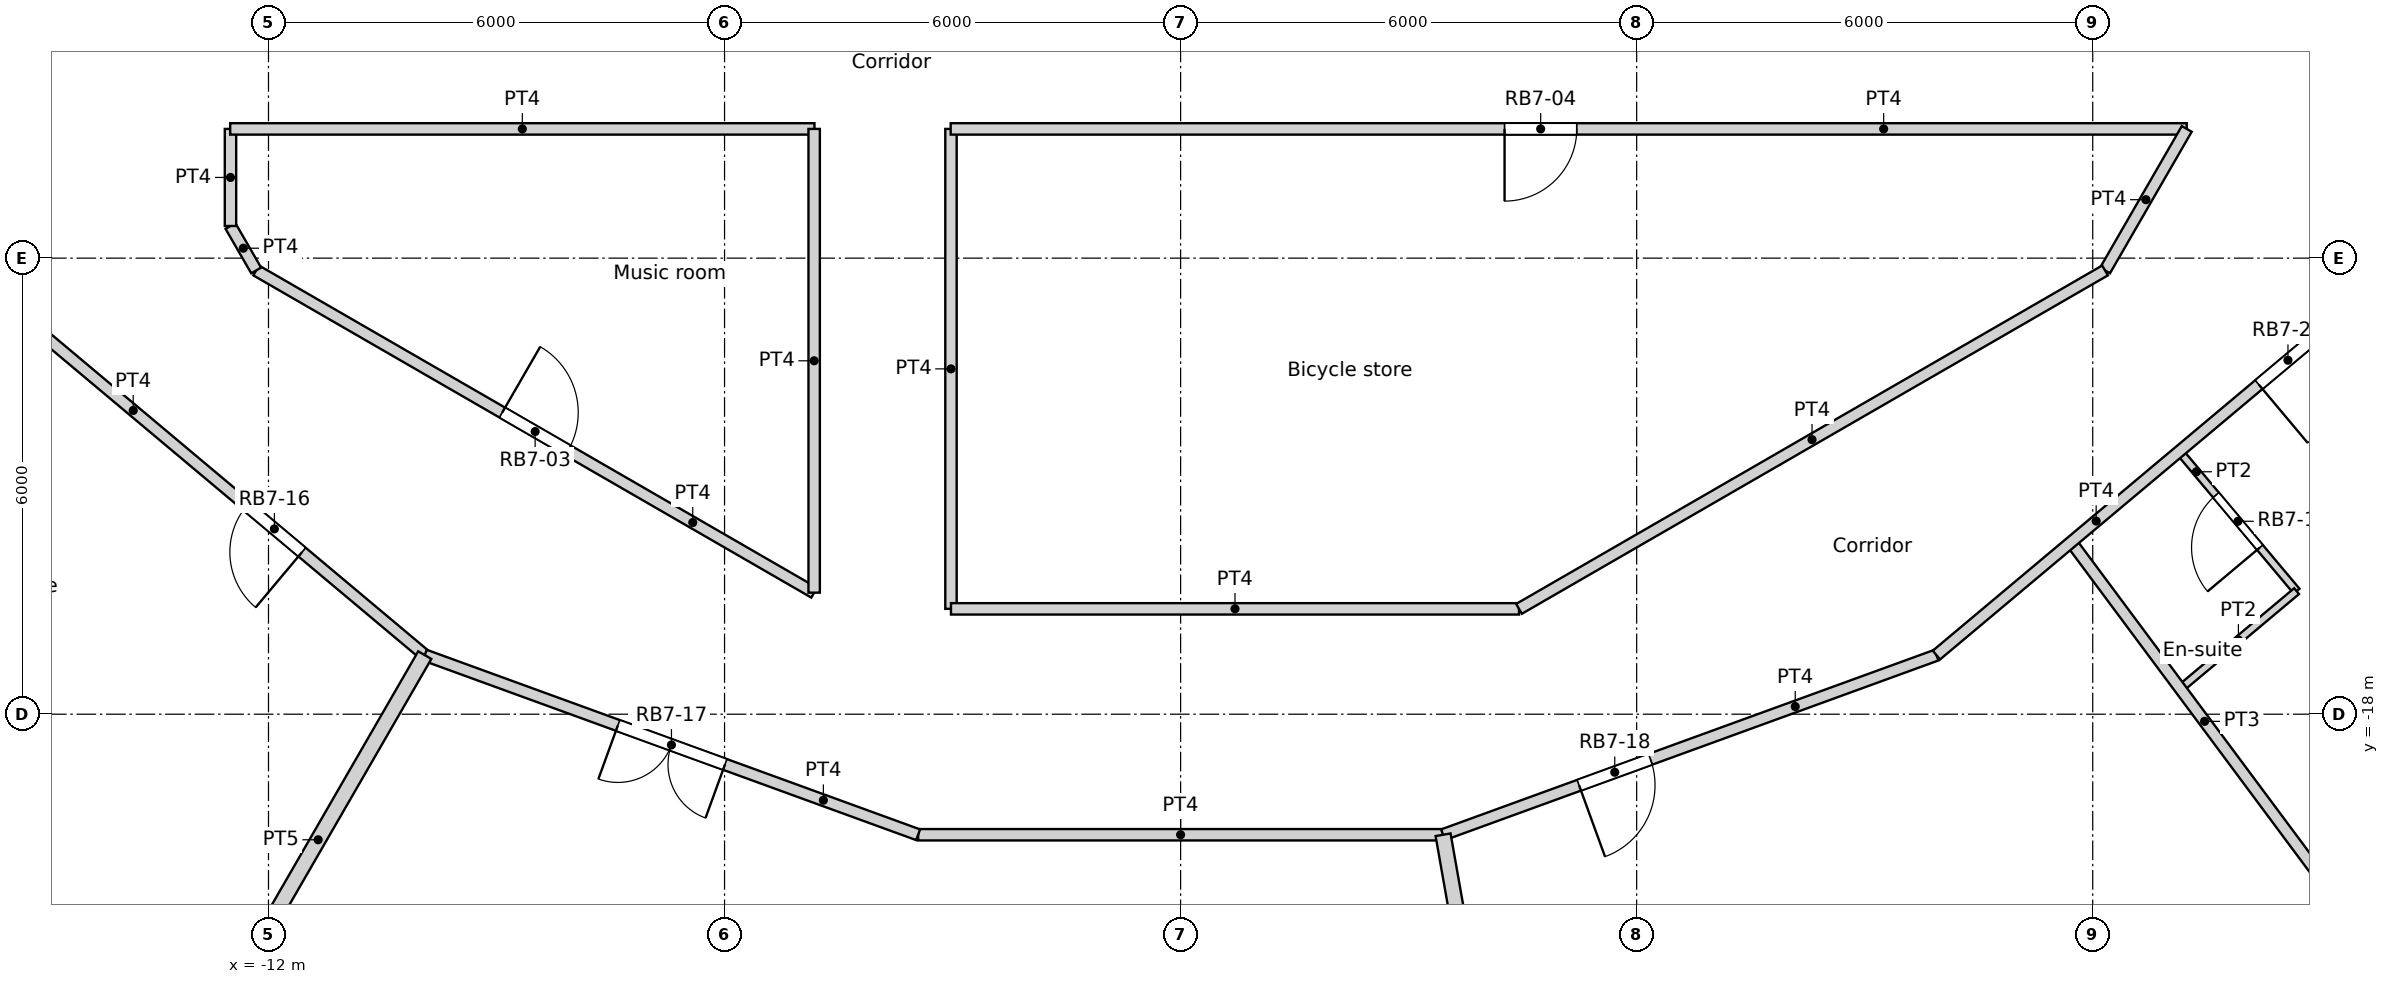
"""IFC4 building model, lengths in metres.
Left out: names, types, materials, properties, quantities, classifications, styles, units other than length and angle.
Written with IfcOpenShell. Run it as: python <this file> out.ifc"""

import sys

from ifc_helpers import new_model, si_unit, direction, frame, frame_2d, origin, origin_2d, place, context, subcontext, project, spatial, rectangle, circle, extrude, element, fill, save


model = new_model("IFC4")
c1 = context("Model", 3, precision=1e-05, world=origin(), true_north=direction((0.0, 1.0)))
c2 = subcontext(c1, "Body", "Model", "MODEL_VIEW")
j1 = project(units=[si_unit("LENGTHUNIT", "METRE"), si_unit("PLANEANGLEUNIT", "RADIAN")], contexts=[c1])
p1 = place(None, origin())
s1 = spatial("IfcSite", under=j1, at=p1, CompositionType="ELEMENT")
p2 = place(p1, origin())
s2 = spatial("IfcBuilding", under=s1, at=p2, CompositionType="ELEMENT")
p3 = place(p2, frame((0.0, 0.0, 190.8)))
s3 = spatial("IfcBuildingStorey", under=s2, at=p3, CompositionType="ELEMENT", Elevation=190.8)
p4 = place(p3, frame((14.659, -19.69, 0.0), z_axis=(0.0, 0.0, 1.0), x_axis=(1.0, 0.0, 0.0)))
e1 = element("IfcColumn", 1, at=p4, inside=s3, PredefinedType="COLUMN", context=c2, shape_type="SweptSolid", body=[
    extrude(circle(Radius=0.6, at=origin_2d()), origin(), (0.0, 0.0, 1.0), 3.6),
])
for number, where, z_axis, x_axis in (
    (2, (-13.798, -12.802, 0.0), (0.0, 0.0, 1.0), (1.0, 0.0, 0.0)),
    (3, (-9.411, -16.301, 0.0), (0.0, 0.0, 1.0), (1.0, 0.0, 0.0)),
    (4, (-4.188, -18.35, 0.0), (0.0, 0.0, 1.0), (1.0, 0.0, 0.0)),
    (5, (1.406, -18.77, 0.0), (0.0, 0.0, 1.0), (1.0, 0.0, 0.0)),
    (6, (6.876, -17.521, 0.0), (0.0, 0.0, 1.0), (1.0, 0.0, 0.0)),
    (7, (11.735, -14.716, 0.0), (0.0, 0.0, 1.0), (1.0, 0.0, 0.0)),
):
    element("IfcColumn", number, at=place(p3, frame(where, z_axis=z_axis, x_axis=x_axis)), inside=s3, PredefinedType="COLUMN", context=c2, shape_type="SweptSolid", body=[
        extrude(circle(Radius=0.65, at=origin_2d()), origin(), (0.0, 0.0, 1.0), 3.6),
    ])
p5 = place(p3, frame((-15.639, -21.048, -0.3), z_axis=(0.0, 0.0, 1.0), x_axis=(0.835514416706, -0.549468524554, 0.0)))
e8 = element("IfcWall", 8, at=p5, inside=s3, PredefinedType="ELEMENTEDWALL", context=c2, shape_type="SweptSolid", body=[
    extrude(rectangle(XDim=3.0, YDim=1.45, at=frame_2d((1.5, 0.0))), origin(), (0.0, 0.0, 1.0), 3.6),
])
p6 = place(p5, frame((1.5, 0.0, 1.85)))
e9 = element("IfcOpeningElement", 9, at=p6, cuts=e8, PredefinedType="OPENING", context=c2, shape_type="SweptSolid", body=[
    extrude(circle(Radius=0.9, at=origin_2d()), frame((0.0, 0.735, 0.0), z_axis=(0.0, -1.0, 0.0), x_axis=(1.0, 0.0, 0.0)), (0.0, 0.0, 1.0), 1.47),
])
p7 = place(p3, frame((12.832, -22.206, 0.0), z_axis=(0.0, 0.0, 1.0), x_axis=(0.835508361394, 0.54947773207, 0.0)))
e10 = element("IfcWall", 10, at=p7, inside=s3, PredefinedType="SOLIDWALL", context=c2, shape_type="SweptSolid", body=[
    extrude(rectangle(XDim=2.973, YDim=0.3, at=frame_2d((1.486, 0.0))), origin(), (0.0, 0.0, 1.0), 2.8),
])
p8 = place(p7, frame((1.486, 0.0, 1.55)))
e11 = element("IfcOpeningElement", 11, at=p8, cuts=e10, PredefinedType="OPENING", context=c2, shape_type="SweptSolid", body=[
    extrude(circle(Radius=0.9, at=origin_2d()), frame((0.0, 0.16, 0.0), z_axis=(0.0, -1.0, 0.0), x_axis=(1.0, 0.0, 0.0)), (0.0, 0.0, 1.0), 0.32),
])
p9 = place(p3, frame((-12.504, -10.3, 0.0), z_axis=(0.0, 0.0, 1.0), x_axis=(1.0, 0.0, 0.0)))
e12 = element("IfcWall", 12, at=p9, inside=s3, PredefinedType="PARTITIONING", context=c2, shape_type="SweptSolid", body=[
    extrude(rectangle(XDim=7.687, YDim=0.15, at=frame_2d((3.844, 0.0))), origin(), (0.0, 0.0, 1.0), 3.3),
])
p10 = place(p3, frame((-3.025, -10.3, 0.0), z_axis=(0.0, 0.0, 1.0), x_axis=(1.0, 0.0, 0.0)))
e13 = element("IfcWall", 13, at=p10, inside=s3, PredefinedType="PARTITIONING", context=c2, shape_type="SweptSolid", body=[
    extrude(rectangle(XDim=16.262, YDim=0.15, at=frame_2d((8.131, 0.0))), origin(), (0.0, 0.0, 1.0), 3.3),
])
p11 = place(p10, frame((7.287, 0.0, 0.0)))
e14 = element("IfcOpeningElement", 14, at=p11, cuts=e13, PredefinedType="OPENING", context=c2, shape_type="SweptSolid", body=[
    extrude(rectangle(XDim=0.95, YDim=2.1, at=frame_2d((0.475, 1.05))), frame((0.0, 0.075, 0.0), z_axis=(0.0, -1.0, 0.0), x_axis=(1.0, 0.0, 0.0)), (0.0, 0.0, 1.0), 0.15),
])
p12 = place(p3, frame((12.162, -12.162, 0.0), z_axis=(0.0, 0.0, 1.0), x_axis=(0.499961633463, 0.866047553582, 0.0)))
e15 = element("IfcWall", 15, at=p12, inside=s3, PredefinedType="PARTITIONING", context=c2, shape_type="SweptSolid", body=[
    extrude(rectangle(XDim=2.15, YDim=0.15, at=frame_2d((1.075, 0.0))), origin(), (0.0, 0.0, 1.0), 3.3),
])
p13 = place(p3, frame((9.943, -17.222, 0.0), z_axis=(0.0, 0.0, 1.0), x_axis=(0.766192104565, 0.642611592567, 0.0)))
e16 = element("IfcWall", 16, at=p13, inside=s3, PredefinedType="PARTITIONING", context=c2, shape_type="SweptSolid", body=[
    extrude(rectangle(XDim=6.906, YDim=0.15, at=frame_2d((3.453, 0.0))), origin(), (0.0, 0.0, 1.0), 3.3),
])
p14 = place(p13, frame((5.537, 0.0, 0.0)))
e17 = element("IfcOpeningElement", 17, at=p14, cuts=e16, PredefinedType="OPENING", context=c2, shape_type="SweptSolid", body=[
    extrude(rectangle(XDim=1.0, YDim=2.1, at=frame_2d((0.5, 1.05))), frame((0.0, 0.075, 0.0), z_axis=(0.0, -1.0, 0.0), x_axis=(1.0, 0.0, 0.0)), (0.0, 0.0, 1.0), 0.15),
])
p15 = place(p3, frame((-12.5, -11.577, 0.0), z_axis=(0.0, 0.0, 1.0), x_axis=(0.0, 1.0, 0.0)))
e18 = element("IfcWall", 18, at=p15, inside=s3, PredefinedType="PARTITIONING", context=c2, shape_type="SweptSolid", body=[
    extrude(rectangle(XDim=1.277, YDim=0.15, at=frame_2d((0.638, 0.0))), origin(), (0.0, 0.0, 1.0), 3.3),
])
p16 = place(p3, frame((-12.5, -11.577, 0.0), z_axis=(0.0, 0.0, 1.0), x_axis=(0.500024767483, -0.866011103799, 0.0)))
e19 = element("IfcWall", 19, at=p16, inside=s3, PredefinedType="PARTITIONING", context=c2, shape_type="SweptSolid", body=[
    extrude(rectangle(XDim=0.676, YDim=0.15, at=frame_2d((0.338, 0.0))), origin(), (0.0, 0.0, 1.0), 3.3),
])
p17 = place(p3, frame((-15.235, -12.784, 0.0), z_axis=(0.0, 0.0, 1.0), x_axis=(0.766192104565, -0.642611592567, 0.0)))
e20 = element("IfcWall", 20, at=p17, inside=s3, PredefinedType="PARTITIONING", context=c2, shape_type="SweptSolid", body=[
    extrude(rectangle(XDim=6.906, YDim=0.15, at=frame_2d((3.453, 0.0))), origin(), (0.0, 0.0, 1.0), 3.3),
])
p18 = place(p17, frame((3.848, 0.0, 0.0)))
e21 = element("IfcOpeningElement", 21, at=p18, cuts=e20, PredefinedType="OPENING", context=c2, shape_type="SweptSolid", body=[
    extrude(rectangle(XDim=0.95, YDim=2.1, at=frame_2d((0.475, 1.05))), frame((0.0, 0.075, 0.0), z_axis=(0.0, -1.0, 0.0), x_axis=(1.0, 0.0, 0.0)), (0.0, 0.0, 1.0), 0.15),
])
p19 = place(p3, frame((-12.162, -12.162, 0.0), z_axis=(0.0, 0.0, 1.0), x_axis=(0.866004766557, -0.500035743023, 0.0)))
e22 = element("IfcWall", 22, at=p19, inside=s3, PredefinedType="PARTITIONING", context=c2, shape_type="SweptSolid", body=[
    extrude(rectangle(XDim=8.477, YDim=0.15, at=frame_2d((4.239, 0.0))), origin(), (0.0, 0.0, 1.0), 3.3),
])
p20 = place(p19, frame((3.738, 0.0, 0.0)))
e23 = element("IfcOpeningElement", 23, at=p20, cuts=e22, PredefinedType="OPENING", context=c2, shape_type="SweptSolid", body=[
    extrude(rectangle(XDim=1.0, YDim=2.04, at=frame_2d((0.5, 1.02))), frame((0.0, 0.075, 0.0), z_axis=(0.0, -1.0, 0.0), x_axis=(1.0, 0.0, 0.0)), (0.0, 0.0, 1.0), 0.15),
])
p21 = place(p3, frame((-4.821, -16.401, 0.0), z_axis=(0.0, 0.0, 1.0), x_axis=(0.0, 1.0, 0.0)))
e24 = element("IfcWall", 24, at=p21, inside=s3, PredefinedType="PARTITIONING", context=c2, shape_type="SweptSolid", body=[
    extrude(rectangle(XDim=6.101, YDim=0.15, at=frame_2d((3.05, 0.0))), origin(), (0.0, 0.0, 1.0), 3.3),
])
p22 = place(p3, frame((-3.021, -16.614, 0.0), z_axis=(0.0, 0.0, 1.0), x_axis=(0.0, 1.0, 0.0)))
e25 = element("IfcWall", 25, at=p22, inside=s3, PredefinedType="PARTITIONING", context=c2, shape_type="SweptSolid", body=[
    extrude(rectangle(XDim=6.314, YDim=0.15, at=frame_2d((3.157, 0.0))), origin(), (0.0, 0.0, 1.0), 3.3),
])
p23 = place(p3, frame((-3.021, -16.614, 0.0), z_axis=(0.0, 0.0, 1.0), x_axis=(1.0, 0.0, 0.0)))
e26 = element("IfcWall", 26, at=p23, inside=s3, PredefinedType="PARTITIONING", context=c2, shape_type="SweptSolid", body=[
    extrude(rectangle(XDim=7.473, YDim=0.15, at=frame_2d((3.736, 0.0))), origin(), (0.0, 0.0, 1.0), 3.3),
])
p24 = place(p3, frame((4.452, -16.614, 0.0), z_axis=(0.0, 0.0, 1.0), x_axis=(0.866005203721, 0.500034985904, 0.0)))
e27 = element("IfcWall", 27, at=p24, inside=s3, PredefinedType="PARTITIONING", context=c2, shape_type="SweptSolid", body=[
    extrude(rectangle(XDim=8.903, YDim=0.15, at=frame_2d((4.452, 0.0))), origin(), (0.0, 0.0, 1.0), 3.3),
])
p25 = place(p3, frame((-3.453, -19.586, 0.0), z_axis=(0.0, 0.0, 1.0), x_axis=(1.0, 0.0, 0.0)))
e28 = element("IfcWall", 28, at=p25, inside=s3, PredefinedType="PARTITIONING", context=c2, shape_type="SweptSolid", body=[
    extrude(rectangle(XDim=6.906, YDim=0.15, at=frame_2d((3.453, 0.0))), origin(), (0.0, 0.0, 1.0), 3.3),
])
p26 = place(p3, frame((-9.944, -17.223, 0.0), z_axis=(0.0, 0.0, 1.0), x_axis=(0.939672634566, -0.342075050021, 0.0)))
e29 = element("IfcWall", 29, at=p26, inside=s3, PredefinedType="PARTITIONING", context=c2, shape_type="SweptSolid", body=[
    extrude(rectangle(XDim=6.908, YDim=0.15, at=frame_2d((3.454, 0.0))), origin(), (0.0, 0.0, 1.0), 3.3),
])
p27 = place(p26, frame((2.704, 0.0, 0.0)))
e30 = element("IfcOpeningElement", 30, at=p27, cuts=e29, PredefinedType="OPENING", context=c2, shape_type="SweptSolid", body=[
    extrude(rectangle(XDim=1.5, YDim=2.1, at=frame_2d((0.75, 1.05))), frame((0.0, 0.075, 0.0), z_axis=(0.0, -1.0, 0.0), x_axis=(1.0, 0.0, 0.0)), (0.0, 0.0, 1.0), 0.15),
])
p28 = place(p3, frame((3.453, -19.586, 0.0), z_axis=(0.0, 0.0, 1.0), x_axis=(0.939672634566, 0.342075050021, 0.0)))
e31 = element("IfcWall", 31, at=p28, inside=s3, PredefinedType="PARTITIONING", context=c2, shape_type="SweptSolid", body=[
    extrude(rectangle(XDim=6.908, YDim=0.15, at=frame_2d((3.454, 0.0))), origin(), (0.0, 0.0, 1.0), 3.3),
])
p29 = place(p28, frame((1.904, 0.0, 0.0)))
e32 = element("IfcOpeningElement", 32, at=p29, cuts=e31, PredefinedType="OPENING", context=c2, shape_type="SweptSolid", body=[
    extrude(rectangle(XDim=1.0, YDim=2.04, at=frame_2d((0.5, 1.02))), frame((0.0, 0.075, 0.0), z_axis=(0.0, -1.0, 0.0), x_axis=(1.0, 0.0, 0.0)), (0.0, 0.0, 1.0), 0.15),
])
p30 = place(p3, frame((-12.749, -22.081, 0.0), z_axis=(0.0, 0.0, 1.0), x_axis=(0.500010020406, 0.866019618423, 0.0)))
e33 = element("IfcWall", 33, at=p30, inside=s3, PredefinedType="PARTITIONING", context=c2, shape_type="SweptSolid", body=[
    extrude(rectangle(XDim=5.61, YDim=0.2, at=frame_2d((2.805, 0.0))), origin(), (0.0, 0.0, 1.0), 3.3),
])
p31 = place(p3, frame((3.453, -19.586, 0.0), z_axis=(0.0, 0.0, 1.0), x_axis=(0.17382754149, -0.984776109489, 0.0)))
e34 = element("IfcWall", 34, at=p31, inside=s3, PredefinedType="PARTITIONING", context=c2, shape_type="SweptSolid", body=[
    extrude(rectangle(XDim=5.61, YDim=0.2, at=frame_2d((2.805, 0.0))), origin(), (0.0, 0.0, 1.0), 3.3),
])
p32 = place(p3, frame((11.717, -15.736, 0.0), z_axis=(0.0, 0.0, 1.0), x_axis=(0.597012012598, -0.802232296043, 0.0)))
e35 = element("IfcWall", 35, at=p32, inside=s3, PredefinedType="PARTITIONING", context=c2, shape_type="SweptSolid", body=[
    extrude(rectangle(XDim=5.878, YDim=0.15, at=frame_2d((2.939, 0.0))), origin(), (0.0, 0.0, 1.0), 3.3),
])
p33 = place(p3, frame((13.151, -17.665, 0.0), z_axis=(0.0, 0.0, 1.0), x_axis=(0.766224532916, 0.642572925945, 0.0)))
e36 = element("IfcWall", 36, at=p33, inside=s3, PredefinedType="PARTITIONING", context=c2, shape_type="SweptSolid", body=[
    extrude(rectangle(XDim=1.998, YDim=0.1, at=frame_2d((0.999, 0.0))), origin(), (0.0, 0.0, 1.0), 3.3),
])
p34 = place(p3, frame((13.139, -14.542, 0.0), z_axis=(0.0, 0.0, 1.0), x_axis=(0.642731657745, -0.766091388891, 0.0)))
e37 = element("IfcWall", 37, at=p34, inside=s3, PredefinedType="PARTITIONING", context=c2, shape_type="SweptSolid", body=[
    extrude(rectangle(XDim=2.401, YDim=0.1, at=frame_2d((1.2, 0.0))), origin(), (0.0, 0.0, 1.0), 3.3),
])
p35 = place(p34, frame((0.75, 0.0, 0.0)))
e38 = element("IfcOpeningElement", 38, at=p35, cuts=e37, PredefinedType="OPENING", context=c2, shape_type="SweptSolid", body=[
    extrude(rectangle(XDim=0.9, YDim=2.04, at=frame_2d((0.45, 1.02))), frame((0.0, 0.05, 0.0), z_axis=(0.0, -1.0, 0.0), x_axis=(1.0, 0.0, 0.0)), (0.0, 0.0, 1.0), 0.1),
])
p36 = place(p20, origin())
e39 = element("IfcDoor", 39, at=p36, inside=s3, OperationType="SINGLE_SWING_LEFT", PredefinedType="DOOR", context=c2, shape_type="SweptSolid", body=[
    extrude(rectangle(XDim=1.0, YDim=2.04, at=frame_2d((0.5, 1.02))), frame((0.0, 0.025, 0.0), z_axis=(0.0, -1.0, 0.0), x_axis=(1.0, 0.0, 0.0)), (0.0, 0.0, 1.0), 0.05),
])
fill(e23, e39)
p37 = place(p11, origin())
e40 = element("IfcDoor", 40, at=p37, inside=s3, OperationType="SINGLE_SWING_RIGHT", PredefinedType="DOOR", context=c2, shape_type="SweptSolid", body=[
    extrude(rectangle(XDim=0.95, YDim=2.1, at=frame_2d((0.475, 1.05))), frame((0.0, 0.025, 0.0), z_axis=(0.0, -1.0, 0.0), x_axis=(1.0, 0.0, 0.0)), (0.0, 0.0, 1.0), 0.05),
])
fill(e14, e40)
p38 = place(p18, origin())
e41 = element("IfcDoor", 41, at=p38, inside=s3, OperationType="SINGLE_SWING_LEFT", PredefinedType="DOOR", context=c2, shape_type="SweptSolid", body=[
    extrude(rectangle(XDim=0.95, YDim=2.1, at=frame_2d((0.475, 1.05))), frame((0.0, 0.025, 0.0), z_axis=(0.0, -1.0, 0.0), x_axis=(1.0, 0.0, 0.0)), (0.0, 0.0, 1.0), 0.05),
])
fill(e21, e41)
p39 = place(p27, origin())
e42 = element("IfcDoor", 42, at=p39, inside=s3, OperationType="DOUBLE_DOOR_SINGLE_SWING", PredefinedType="DOOR", context=c2, shape_type="SweptSolid", body=[
    extrude(rectangle(XDim=1.5, YDim=2.1, at=frame_2d((0.75, 1.05))), frame((0.0, 0.025, 0.0), z_axis=(0.0, -1.0, 0.0), x_axis=(1.0, 0.0, 0.0)), (0.0, 0.0, 1.0), 0.05),
])
fill(e30, e42)
p40 = place(p29, origin())
e43 = element("IfcDoor", 43, at=p40, inside=s3, OperationType="SINGLE_SWING_RIGHT", PredefinedType="DOOR", context=c2, shape_type="SweptSolid", body=[
    extrude(rectangle(XDim=1.0, YDim=2.04, at=frame_2d((0.5, 1.02))), frame((0.0, 0.025, 0.0), z_axis=(0.0, -1.0, 0.0), x_axis=(1.0, 0.0, 0.0)), (0.0, 0.0, 1.0), 0.05),
])
fill(e32, e43)
p41 = place(p35, origin())
e44 = element("IfcDoor", 44, at=p41, inside=s3, OperationType="SINGLE_SWING_LEFT", PredefinedType="DOOR", context=c2, shape_type="SweptSolid", body=[
    extrude(rectangle(XDim=0.9, YDim=2.04, at=frame_2d((0.45, 1.02))), frame((0.0, 0.025, 0.0), z_axis=(0.0, -1.0, 0.0), x_axis=(1.0, 0.0, 0.0)), (0.0, 0.0, 1.0), 0.05),
])
fill(e38, e44)
p42 = place(p14, origin())
e45 = element("IfcDoor", 45, at=p42, inside=s3, OperationType="SINGLE_SWING_RIGHT", PredefinedType="DOOR", context=c2, shape_type="SweptSolid", body=[
    extrude(rectangle(XDim=1.0, YDim=2.1, at=frame_2d((0.5, 1.05))), frame((0.0, 0.025, 0.0), z_axis=(0.0, -1.0, 0.0), x_axis=(1.0, 0.0, 0.0)), (0.0, 0.0, 1.0), 0.05),
])
fill(e17, e45)
save(model, sys.argv[1])
